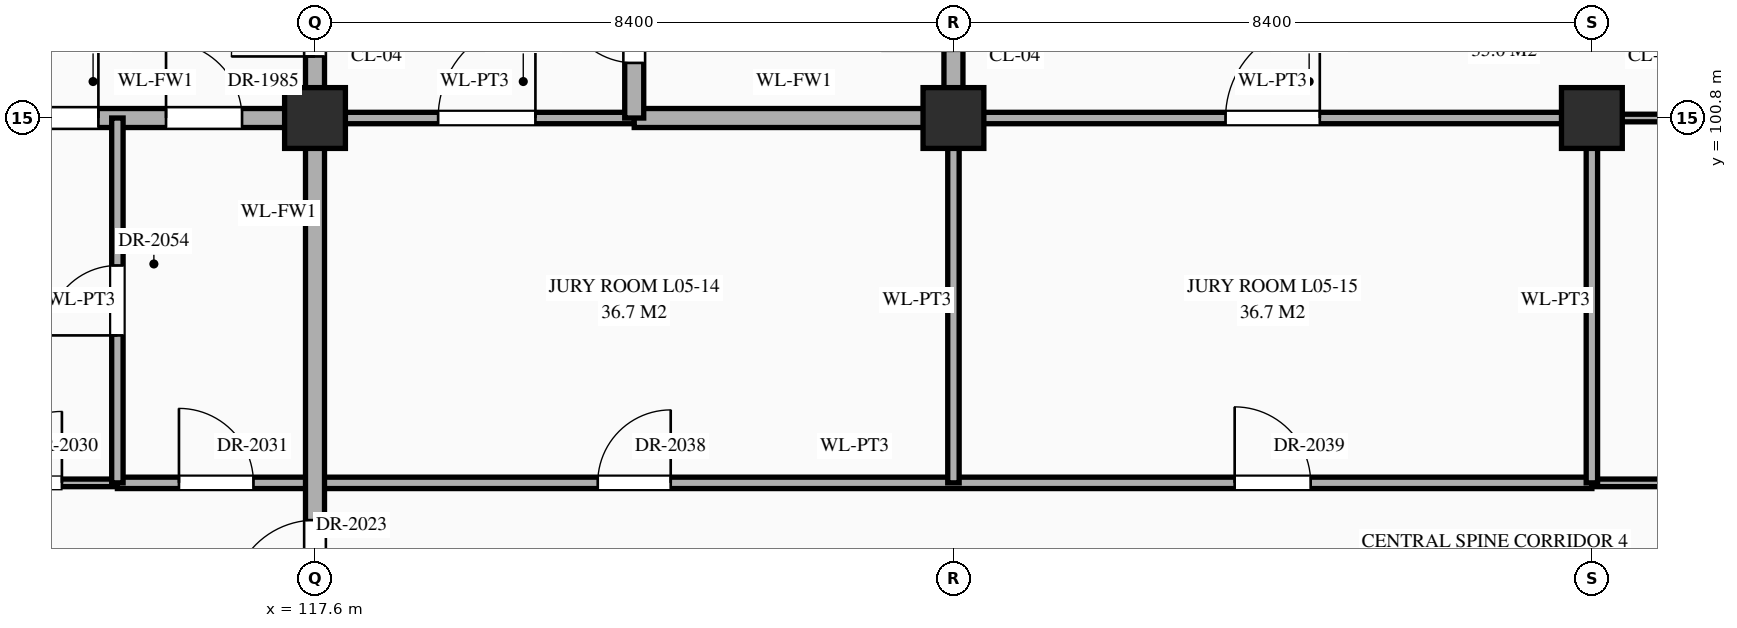
"""IFC4 building model, lengths in metres.
Left out: names, types, materials, properties, quantities, classifications, styles, units other than length and angle.
Written with IfcOpenShell. Run it as: python <this file> out.ifc"""

import sys

from ifc_helpers import new_model, si_unit, direction, frame, frame_2d, origin, origin_2d, place, context, subcontext, project, spatial, rectangle, extrude, element, fill, save


model = new_model("IFC4")
c1 = context("Model", 3, precision=1e-05, world=origin(), true_north=direction((0.0, 1.0)))
c2 = subcontext(c1, "Body", "Model", "MODEL_VIEW")
j1 = project(units=[si_unit("LENGTHUNIT", "METRE"), si_unit("PLANEANGLEUNIT", "RADIAN")], contexts=[c1])
p1 = place(None, origin())
s1 = spatial("IfcSite", under=j1, at=p1, CompositionType="ELEMENT")
p2 = place(p1, origin())
s2 = spatial("IfcBuilding", under=s1, at=p2, CompositionType="ELEMENT")
p3 = place(p2, frame((0.0, 0.0, 21.6)))
s3 = spatial("IfcBuildingStorey", under=s2, at=p3, CompositionType="ELEMENT", Elevation=21.6)
for number, where, z_axis, x_axis in (
    (1, (117.6, 100.8, 0.0), (0.0, 0.0, 1.0), (1.0, 0.0, 0.0)),
    (2, (126.0, 100.8, 0.0), (0.0, 0.0, 1.0), (1.0, 0.0, 0.0)),
    (3, (134.4, 100.8, 0.0), (0.0, 0.0, 1.0), (1.0, 0.0, 0.0)),
):
    element("IfcColumn", number, at=place(p3, frame(where, z_axis=z_axis, x_axis=x_axis)), inside=s3, PredefinedType="COLUMN", context=c2, shape_type="SweptSolid", body=[
        extrude(rectangle(XDim=0.8, YDim=0.8, at=origin_2d()), origin(), (0.0, 0.0, 1.0), 4.5),
    ])
p4 = place(p3, frame((109.2, 96.0, 0.0), z_axis=(0.0, 0.0, 1.0), x_axis=(1.0, 0.0, 0.0)))
e4 = element("IfcWall", 4, at=p4, inside=s3, PredefinedType="STANDARD", context=c2, shape_type="SweptSolid", body=[
    extrude(rectangle(XDim=5.8, YDim=0.1, at=frame_2d((2.9, 0.0))), origin(), (0.0, 0.0, 1.0), 4.24),
])
p5 = place(p4, frame((1.06, 0.0, 0.0)))
e5 = element("IfcOpeningElement", 5, at=p5, cuts=e4, PredefinedType="OPENING", context=c2, shape_type="SweptSolid", body=[
    extrude(rectangle(XDim=1.28, YDim=2.35, at=frame_2d((0.64, 1.175))), frame((0.0, 0.062, 0.0), z_axis=(0.0, -1.0, 0.0), x_axis=(1.0, 0.0, 0.0)), (0.0, 0.0, 1.0), 0.124),
])
p6 = place(p4, frame((4.13, 0.0, 0.0)))
e6 = element("IfcOpeningElement", 6, at=p6, cuts=e4, PredefinedType="OPENING", context=c2, shape_type="SweptSolid", body=[
    extrude(rectangle(XDim=0.94, YDim=2.3, at=frame_2d((0.47, 1.15))), frame((0.0, 0.062, 0.0), z_axis=(0.0, -1.0, 0.0), x_axis=(1.0, 0.0, 0.0)), (0.0, 0.0, 1.0), 0.124),
])
p7 = place(p3, frame((115.0, 96.0, 0.0), z_axis=(0.0, 0.0, 1.0), x_axis=(1.0, 0.0, 0.0)))
e7 = element("IfcWall", 7, at=p7, inside=s3, PredefinedType="STANDARD", context=c2, shape_type="SweptSolid", body=[
    extrude(rectangle(XDim=19.4, YDim=0.15, at=frame_2d((9.7, 0.0))), origin(), (0.0, 0.0, 1.0), 4.24),
])
p8 = place(p7, frame((0.81, 0.0, 0.0)))
e8 = element("IfcOpeningElement", 8, at=p8, cuts=e7, PredefinedType="OPENING", context=c2, shape_type="SweptSolid", body=[
    extrude(rectangle(XDim=0.98, YDim=2.35, at=frame_2d((0.49, 1.175))), frame((0.0, 0.087, 0.0), z_axis=(0.0, -1.0, 0.0), x_axis=(1.0, 0.0, 0.0)), (0.0, 0.0, 1.0), 0.174),
])
p9 = place(p7, frame((6.32, 0.0, 0.0)))
e9 = element("IfcOpeningElement", 9, at=p9, cuts=e7, PredefinedType="OPENING", context=c2, shape_type="SweptSolid", body=[
    extrude(rectangle(XDim=0.96, YDim=2.2, at=frame_2d((0.48, 1.1))), frame((0.0, 0.087, 0.0), z_axis=(0.0, -1.0, 0.0), x_axis=(1.0, 0.0, 0.0)), (0.0, 0.0, 1.0), 0.174),
])
p10 = place(p7, frame((14.7, 0.0, 0.0)))
e10 = element("IfcOpeningElement", 10, at=p10, cuts=e7, PredefinedType="OPENING", context=c2, shape_type="SweptSolid", body=[
    extrude(rectangle(XDim=1.0, YDim=2.25, at=frame_2d((0.5, 1.125))), frame((0.0, 0.087, 0.0), z_axis=(0.0, -1.0, 0.0), x_axis=(1.0, 0.0, 0.0)), (0.0, 0.0, 1.0), 0.174),
])
p11 = place(p3, frame((134.4, 96.0, 0.0), z_axis=(0.0, 0.0, 1.0), x_axis=(1.0, 0.0, 0.0)))
e11 = element("IfcWall", 11, at=p11, inside=s3, PredefinedType="STANDARD", context=c2, shape_type="SweptSolid", body=[
    extrude(rectangle(XDim=5.8, YDim=0.1, at=frame_2d((2.9, 0.0))), origin(), (0.0, 0.0, 1.0), 4.24),
])
p12 = place(p11, frame((1.18, 0.0, 0.0)))
e12 = element("IfcOpeningElement", 12, at=p12, cuts=e11, PredefinedType="OPENING", context=c2, shape_type="SweptSolid", body=[
    extrude(rectangle(XDim=1.04, YDim=2.2, at=frame_2d((0.52, 1.1))), frame((0.0, 0.062, 0.0), z_axis=(0.0, -1.0, 0.0), x_axis=(1.0, 0.0, 0.0)), (0.0, 0.0, 1.0), 0.124),
])
p13 = place(p11, frame((4.06, 0.0, 0.0)))
e13 = element("IfcOpeningElement", 13, at=p13, cuts=e11, PredefinedType="OPENING", context=c2, shape_type="SweptSolid", body=[
    extrude(rectangle(XDim=1.08, YDim=2.25, at=frame_2d((0.54, 1.125))), frame((0.0, 0.062, 0.0), z_axis=(0.0, -1.0, 0.0), x_axis=(1.0, 0.0, 0.0)), (0.0, 0.0, 1.0), 0.124),
])
p14 = place(p3, frame((113.4, 100.8, 0.0), z_axis=(0.0, 0.0, 1.0), x_axis=(1.0, 0.0, 0.0)))
e14 = element("IfcWall", 14, at=p14, inside=s3, PredefinedType="STANDARD", context=c2, shape_type="SweptSolid", body=[
    extrude(rectangle(XDim=4.2, YDim=0.25, at=frame_2d((2.1, 0.0))), origin(), (0.0, 0.0, 1.0), 3.39),
])
p15 = place(p14, frame((0.25, 0.0, 0.0)))
e15 = element("IfcOpeningElement", 15, at=p15, cuts=e14, PredefinedType="OPENING", context=c2, shape_type="SweptSolid", body=[
    extrude(rectangle(XDim=1.1, YDim=2.2, at=frame_2d((0.55, 1.1))), frame((0.0, 0.137, 0.0), z_axis=(0.0, -1.0, 0.0), x_axis=(1.0, 0.0, 0.0)), (0.0, 0.0, 1.0), 0.274),
])
p16 = place(p14, frame((2.24, 0.0, 0.0)))
e16 = element("IfcOpeningElement", 16, at=p16, cuts=e14, PredefinedType="OPENING", context=c2, shape_type="SweptSolid", body=[
    extrude(rectangle(XDim=1.0, YDim=2.2, at=frame_2d((0.5, 1.1))), frame((0.0, 0.137, 0.0), z_axis=(0.0, -1.0, 0.0), x_axis=(1.0, 0.0, 0.0)), (0.0, 0.0, 1.0), 0.274),
])
p17 = place(p3, frame((117.6, 100.8, 0.0), z_axis=(0.0, 0.0, 1.0), x_axis=(1.0, 0.0, 0.0)))
e17 = element("IfcWall", 17, at=p17, inside=s3, PredefinedType="STANDARD", context=c2, shape_type="SweptSolid", body=[
    extrude(rectangle(XDim=4.2, YDim=0.15, at=frame_2d((2.1, 0.0))), origin(), (0.0, 0.0, 1.0), 3.39),
])
p18 = place(p17, frame((1.62, 0.0, 0.0)))
e18 = element("IfcOpeningElement", 18, at=p18, cuts=e17, PredefinedType="OPENING", context=c2, shape_type="SweptSolid", body=[
    extrude(rectangle(XDim=1.28, YDim=2.35, at=frame_2d((0.64, 1.175))), frame((0.0, 0.087, 0.0), z_axis=(0.0, -1.0, 0.0), x_axis=(1.0, 0.0, 0.0)), (0.0, 0.0, 1.0), 0.174),
])
p19 = place(p3, frame((121.8, 100.8, 0.0), z_axis=(0.0, 0.0, 1.0), x_axis=(1.0, 0.0, 0.0)))
e19 = element("IfcWall", 19, at=p19, inside=s3, PredefinedType="STANDARD", context=c2, shape_type="SweptSolid", body=[
    extrude(rectangle(XDim=4.2, YDim=0.25, at=frame_2d((2.1, 0.0))), origin(), (0.0, 0.0, 1.0), 3.39),
])
p20 = place(p3, frame((126.0, 100.8, 0.0), z_axis=(0.0, 0.0, 1.0), x_axis=(1.0, 0.0, 0.0)))
e20 = element("IfcWall", 20, at=p20, inside=s3, PredefinedType="STANDARD", context=c2, shape_type="SweptSolid", body=[
    extrude(rectangle(XDim=8.4, YDim=0.15, at=frame_2d((4.2, 0.0))), origin(), (0.0, 0.0, 1.0), 3.39),
])
p21 = place(p20, frame((3.58, 0.0, 0.0)))
e21 = element("IfcOpeningElement", 21, at=p21, cuts=e20, PredefinedType="OPENING", context=c2, shape_type="SweptSolid", body=[
    extrude(rectangle(XDim=1.24, YDim=2.3, at=frame_2d((0.62, 1.15))), frame((0.0, 0.087, 0.0), z_axis=(0.0, -1.0, 0.0), x_axis=(1.0, 0.0, 0.0)), (0.0, 0.0, 1.0), 0.174),
])
p22 = place(p3, frame((134.4, 100.8, 0.0), z_axis=(0.0, 0.0, 1.0), x_axis=(1.0, 0.0, 0.0)))
e22 = element("IfcWall", 22, at=p22, inside=s3, PredefinedType="STANDARD", context=c2, shape_type="SweptSolid", body=[
    extrude(rectangle(XDim=5.8, YDim=0.1, at=frame_2d((2.9, 0.0))), origin(), (0.0, 0.0, 1.0), 3.39),
])
p23 = place(p22, frame((1.22, 0.0, 0.0)))
e23 = element("IfcOpeningElement", 23, at=p23, cuts=e22, PredefinedType="OPENING", context=c2, shape_type="SweptSolid", body=[
    extrude(rectangle(XDim=1.28, YDim=2.35, at=frame_2d((0.64, 1.175))), frame((0.0, 0.062, 0.0), z_axis=(0.0, -1.0, 0.0), x_axis=(1.0, 0.0, 0.0)), (0.0, 0.0, 1.0), 0.124),
])
p24 = place(p22, frame((4.13, 0.0, 0.0)))
e24 = element("IfcOpeningElement", 24, at=p24, cuts=e22, PredefinedType="OPENING", context=c2, shape_type="SweptSolid", body=[
    extrude(rectangle(XDim=0.94, YDim=2.3, at=frame_2d((0.47, 1.15))), frame((0.0, 0.062, 0.0), z_axis=(0.0, -1.0, 0.0), x_axis=(1.0, 0.0, 0.0)), (0.0, 0.0, 1.0), 0.124),
])
p25 = place(p3, frame((115.0, 96.0, 0.0), z_axis=(0.0, 0.0, 1.0), x_axis=(0.0, 1.0, 0.0)))
e25 = element("IfcWall", 25, at=p25, inside=s3, PredefinedType="STANDARD", context=c2, shape_type="SweptSolid", body=[
    extrude(rectangle(XDim=4.8, YDim=0.15, at=frame_2d((2.4, 0.0))), origin(), (0.0, 0.0, 1.0), 4.24),
])
p26 = place(p25, frame((1.94, 0.0, 0.0)))
e26 = element("IfcOpeningElement", 26, at=p26, cuts=e25, PredefinedType="OPENING", context=c2, shape_type="SweptSolid", body=[
    extrude(rectangle(XDim=0.92, YDim=2.15, at=frame_2d((0.46, 1.075))), frame((0.0, 0.087, 0.0), z_axis=(0.0, -1.0, 0.0), x_axis=(1.0, 0.0, 0.0)), (0.0, 0.0, 1.0), 0.174),
])
p27 = place(p3, frame((117.6, 91.2, 0.0), z_axis=(0.0, 0.0, 1.0), x_axis=(0.0, 1.0, 0.0)))
e27 = element("IfcWall", 27, at=p27, inside=s3, PredefinedType="STANDARD", context=c2, shape_type="SweptSolid", body=[
    extrude(rectangle(XDim=13.2, YDim=0.25, at=frame_2d((6.6, 0.0))), origin(), (0.0, 0.0, 1.0), 3.49),
])
p28 = place(p27, frame((0.565, 0.0, 0.0)))
e28 = element("IfcOpeningElement", 28, at=p28, cuts=e27, PredefinedType="OPENING", context=c2, shape_type="SweptSolid", body=[
    extrude(rectangle(XDim=0.95, YDim=2.15, at=frame_2d((0.475, 1.075))), frame((0.0, 0.137, 0.0), z_axis=(0.0, -1.0, 0.0), x_axis=(1.0, 0.0, 0.0)), (0.0, 0.0, 1.0), 0.274),
])
p29 = place(p27, frame((10.41, 0.0, 0.0)))
e29 = element("IfcOpeningElement", 29, at=p29, cuts=e27, PredefinedType="OPENING", context=c2, shape_type="SweptSolid", body=[
    extrude(rectangle(XDim=1.1, YDim=2.2, at=frame_2d((0.55, 1.1))), frame((0.0, 0.137, 0.0), z_axis=(0.0, -1.0, 0.0), x_axis=(1.0, 0.0, 0.0)), (0.0, 0.0, 1.0), 0.274),
])
p30 = place(p27, frame((3.21, 0.0, 0.0)))
e30 = element("IfcOpeningElement", 30, at=p30, cuts=e27, PredefinedType="OPENING", context=c2, shape_type="SweptSolid", body=[
    extrude(rectangle(XDim=1.1, YDim=2.2, at=frame_2d((0.55, 1.1))), frame((0.0, 0.137, 0.0), z_axis=(0.0, -1.0, 0.0), x_axis=(1.0, 0.0, 0.0)), (0.0, 0.0, 1.0), 0.274),
])
p31 = place(p3, frame((121.8, 100.8, 0.0), z_axis=(0.0, 0.0, 1.0), x_axis=(0.0, 1.0, 0.0)))
e31 = element("IfcWall", 31, at=p31, inside=s3, PredefinedType="STANDARD", context=c2, shape_type="SweptSolid", body=[
    extrude(rectangle(XDim=3.6, YDim=0.25, at=frame_2d((1.8, 0.0))), origin(), (0.0, 0.0, 1.0), 3.89),
])
p32 = place(p31, frame((0.725, 0.0, 0.0)))
e32 = element("IfcOpeningElement", 32, at=p32, cuts=e31, PredefinedType="OPENING", context=c2, shape_type="SweptSolid", body=[
    extrude(rectangle(XDim=0.95, YDim=2.15, at=frame_2d((0.475, 1.075))), frame((0.0, 0.137, 0.0), z_axis=(0.0, -1.0, 0.0), x_axis=(1.0, 0.0, 0.0)), (0.0, 0.0, 1.0), 0.274),
])
p33 = place(p3, frame((126.0, 96.0, 0.0), z_axis=(0.0, 0.0, 1.0), x_axis=(0.0, 1.0, 0.0)))
e33 = element("IfcWall", 33, at=p33, inside=s3, PredefinedType="STANDARD", context=c2, shape_type="SweptSolid", body=[
    extrude(rectangle(XDim=4.8, YDim=0.15, at=frame_2d((2.4, 0.0))), origin(), (0.0, 0.0, 1.0), 3.49),
])
p34 = place(p3, frame((126.0, 100.8, 0.0), z_axis=(0.0, 0.0, 1.0), x_axis=(0.0, 1.0, 0.0)))
e34 = element("IfcWall", 34, at=p34, inside=s3, PredefinedType="STANDARD", context=c2, shape_type="SweptSolid", body=[
    extrude(rectangle(XDim=3.6, YDim=0.25, at=frame_2d((1.8, 0.0))), origin(), (0.0, 0.0, 1.0), 3.49),
])
p35 = place(p34, frame((0.885, 0.0, 0.0)))
e35 = element("IfcOpeningElement", 35, at=p35, cuts=e34, PredefinedType="OPENING", context=c2, shape_type="SweptSolid", body=[
    extrude(rectangle(XDim=0.95, YDim=2.15, at=frame_2d((0.475, 1.075))), frame((0.0, 0.137, 0.0), z_axis=(0.0, -1.0, 0.0), x_axis=(1.0, 0.0, 0.0)), (0.0, 0.0, 1.0), 0.274),
])
p36 = place(p3, frame((134.4, 96.0, 0.0), z_axis=(0.0, 0.0, 1.0), x_axis=(0.0, 1.0, 0.0)))
e36 = element("IfcWall", 36, at=p36, inside=s3, PredefinedType="STANDARD", context=c2, shape_type="SweptSolid", body=[
    extrude(rectangle(XDim=4.8, YDim=0.15, at=frame_2d((2.4, 0.0))), origin(), (0.0, 0.0, 1.0), 4.24),
])
p37 = place(p32, origin())
e37 = element("IfcDoor", 37, at=p37, inside=s3, OperationType="SINGLE_SWING_RIGHT", PredefinedType="DOOR", context=c2, shape_type="SweptSolid", body=[
    extrude(rectangle(XDim=0.95, YDim=2.15, at=frame_2d((0.475, 1.075))), frame((0.0, 0.025, 0.0), z_axis=(0.0, -1.0, 0.0), x_axis=(1.0, 0.0, 0.0)), (0.0, 0.0, 1.0), 0.05),
])
fill(e32, e37)
p38 = place(p29, origin())
e38 = element("IfcDoor", 38, at=p38, inside=s3, OperationType="SINGLE_SWING_LEFT", PredefinedType="DOOR", context=c2, shape_type="SweptSolid", body=[
    extrude(rectangle(XDim=1.1, YDim=2.2, at=frame_2d((0.55, 1.1))), frame((0.0, 0.025, 0.0), z_axis=(0.0, -1.0, 0.0), x_axis=(1.0, 0.0, 0.0)), (0.0, 0.0, 1.0), 0.05),
])
fill(e29, e38)
p39 = place(p18, origin())
e39 = element("IfcDoor", 39, at=p39, inside=s3, OperationType="SINGLE_SWING_RIGHT", PredefinedType="DOOR", context=c2, shape_type="SweptSolid", body=[
    extrude(rectangle(XDim=1.28, YDim=2.35, at=frame_2d((0.64, 1.175))), frame((0.0, 0.025, 0.0), z_axis=(0.0, -1.0, 0.0), x_axis=(1.0, 0.0, 0.0)), (0.0, 0.0, 1.0), 0.05),
])
fill(e18, e39)
p40 = place(p15, origin())
e40 = element("IfcDoor", 40, at=p40, inside=s3, OperationType="SINGLE_SWING_RIGHT", PredefinedType="DOOR", context=c2, shape_type="SweptSolid", body=[
    extrude(rectangle(XDim=1.1, YDim=2.2, at=frame_2d((0.55, 1.1))), frame((0.0, 0.025, 0.0), z_axis=(0.0, -1.0, 0.0), x_axis=(1.0, 0.0, 0.0)), (0.0, 0.0, 1.0), 0.05),
])
fill(e15, e40)
p41 = place(p16, origin())
e41 = element("IfcDoor", 41, at=p41, inside=s3, OperationType="SINGLE_SWING_LEFT", PredefinedType="DOOR", context=c2, shape_type="SweptSolid", body=[
    extrude(rectangle(XDim=1.0, YDim=2.2, at=frame_2d((0.5, 1.1))), frame((0.0, 0.025, 0.0), z_axis=(0.0, -1.0, 0.0), x_axis=(1.0, 0.0, 0.0)), (0.0, 0.0, 1.0), 0.05),
])
fill(e16, e41)
p42 = place(p21, origin())
e42 = element("IfcDoor", 42, at=p42, inside=s3, OperationType="SINGLE_SWING_RIGHT", PredefinedType="DOOR", context=c2, shape_type="SweptSolid", body=[
    extrude(rectangle(XDim=1.24, YDim=2.3, at=frame_2d((0.62, 1.15))), frame((0.0, 0.025, 0.0), z_axis=(0.0, -1.0, 0.0), x_axis=(1.0, 0.0, 0.0)), (0.0, 0.0, 1.0), 0.05),
])
fill(e21, e42)
p43 = place(p30, origin())
e43 = element("IfcDoor", 43, at=p43, inside=s3, OperationType="SINGLE_SWING_LEFT", PredefinedType="DOOR", context=c2, shape_type="SweptSolid", body=[
    extrude(rectangle(XDim=1.1, YDim=2.2, at=frame_2d((0.55, 1.1))), frame((0.0, 0.025, 0.0), z_axis=(0.0, -1.0, 0.0), x_axis=(1.0, 0.0, 0.0)), (0.0, 0.0, 1.0), 0.05),
])
fill(e30, e43)
p44 = place(p6, origin())
e44 = element("IfcDoor", 44, at=p44, inside=s3, OperationType="SINGLE_SWING_RIGHT", PredefinedType="DOOR", context=c2, shape_type="SweptSolid", body=[
    extrude(rectangle(XDim=0.94, YDim=2.3, at=frame_2d((0.47, 1.15))), frame((0.0, 0.025, 0.0), z_axis=(0.0, -1.0, 0.0), x_axis=(1.0, 0.0, 0.0)), (0.0, 0.0, 1.0), 0.05),
])
fill(e6, e44)
p45 = place(p8, origin())
e45 = element("IfcDoor", 45, at=p45, inside=s3, OperationType="SINGLE_SWING_LEFT", PredefinedType="DOOR", context=c2, shape_type="SweptSolid", body=[
    extrude(rectangle(XDim=0.98, YDim=2.35, at=frame_2d((0.49, 1.175))), frame((0.0, 0.025, 0.0), z_axis=(0.0, -1.0, 0.0), x_axis=(1.0, 0.0, 0.0)), (0.0, 0.0, 1.0), 0.05),
])
fill(e8, e45)
p46 = place(p9, origin())
e46 = element("IfcDoor", 46, at=p46, inside=s3, OperationType="SINGLE_SWING_RIGHT", PredefinedType="DOOR", context=c2, shape_type="SweptSolid", body=[
    extrude(rectangle(XDim=0.96, YDim=2.2, at=frame_2d((0.48, 1.1))), frame((0.0, 0.025, 0.0), z_axis=(0.0, -1.0, 0.0), x_axis=(1.0, 0.0, 0.0)), (0.0, 0.0, 1.0), 0.05),
])
fill(e9, e46)
p47 = place(p10, origin())
e47 = element("IfcDoor", 47, at=p47, inside=s3, OperationType="SINGLE_SWING_LEFT", PredefinedType="DOOR", context=c2, shape_type="SweptSolid", body=[
    extrude(rectangle(XDim=1.0, YDim=2.25, at=frame_2d((0.5, 1.125))), frame((0.0, 0.025, 0.0), z_axis=(0.0, -1.0, 0.0), x_axis=(1.0, 0.0, 0.0)), (0.0, 0.0, 1.0), 0.05),
])
fill(e10, e47)
p48 = place(p26, origin())
e48 = element("IfcDoor", 48, at=p48, inside=s3, OperationType="SINGLE_SWING_LEFT", PredefinedType="DOOR", context=c2, shape_type="SweptSolid", body=[
    extrude(rectangle(XDim=0.92, YDim=2.15, at=frame_2d((0.46, 1.075))), frame((0.0, 0.025, 0.0), z_axis=(0.0, -1.0, 0.0), x_axis=(1.0, 0.0, 0.0)), (0.0, 0.0, 1.0), 0.05),
])
fill(e26, e48)
save(model, sys.argv[1])
